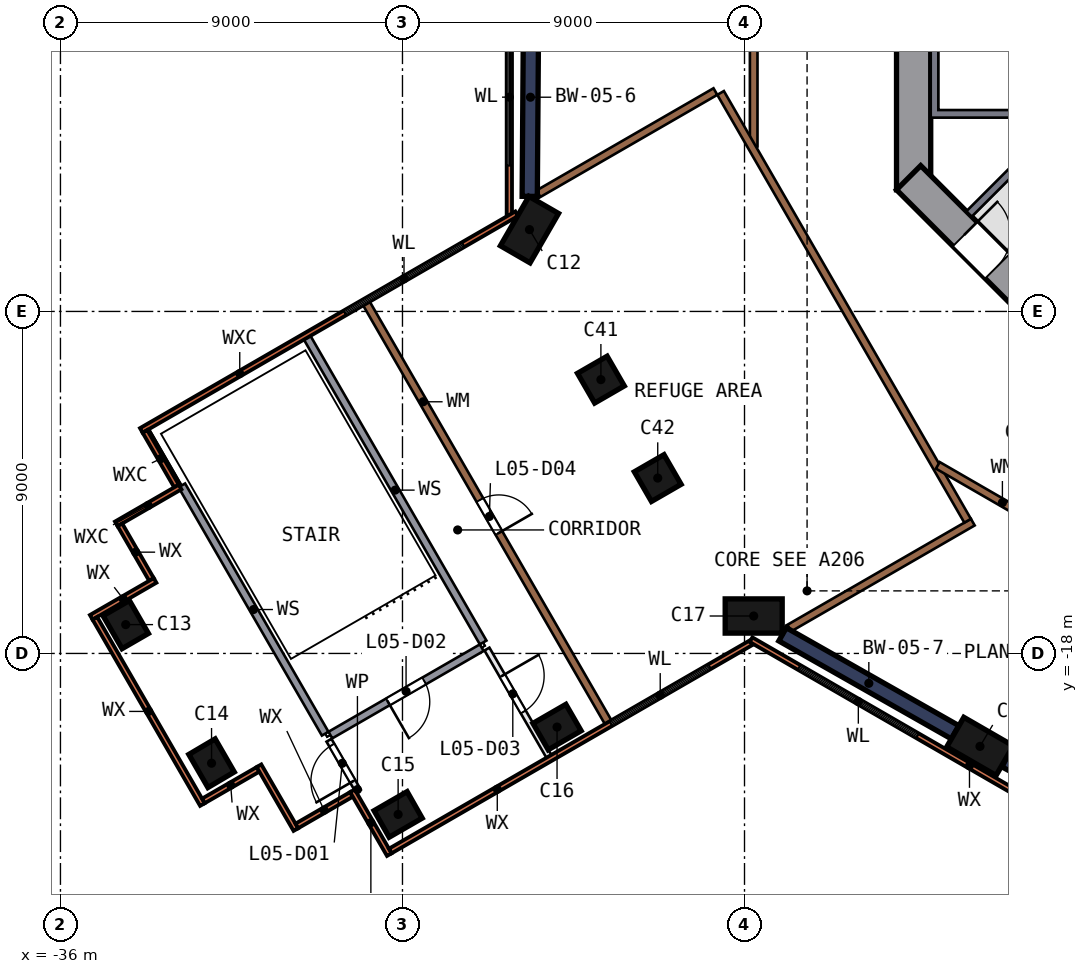
"""IFC4 building model, lengths in metres.
Left out: names, types, materials, properties, quantities, classifications, styles, units other than length and angle.
Written with IfcOpenShell. Run it as: python <this file> out.ifc"""

import sys

from ifc_helpers import new_model, si_unit, direction, frame, frame_2d, origin, origin_2d, place, context, subcontext, project, spatial, polyline, rectangle, outline, extrude, element, fill, save


model = new_model("IFC4")
c1 = context("Model", 3, precision=1e-05, world=origin(), true_north=direction((0.0, 1.0)))
c2 = subcontext(c1, "Body", "Model", "MODEL_VIEW")
j1 = project(units=[si_unit("LENGTHUNIT", "METRE"), si_unit("PLANEANGLEUNIT", "RADIAN")], contexts=[c1])
p1 = place(None, origin())
s1 = spatial("IfcSite", under=j1, at=p1, CompositionType="ELEMENT")
p2 = place(p1, origin())
s2 = spatial("IfcBuilding", under=s1, at=p2, CompositionType="ELEMENT")
p3 = place(p2, frame((0.0, 0.0, 28.0)))
s3 = spatial("IfcBuildingStorey", under=s2, at=p3, CompositionType="ELEMENT", Elevation=28.0)
p4 = place(p3, frame((-23.658, -6.846, 0.0), z_axis=(0.0, 0.0, 1.0), x_axis=(0.5, 0.866025404, 0.0)))
e1 = element("IfcColumn", 1, at=p4, inside=s3, PredefinedType="COLUMN", context=c2, shape_type="SweptSolid", body=[
    extrude(rectangle(XDim=1.5, YDim=0.9, at=origin_2d()), origin(), (0.0, 0.0, 1.0), 4.5),
])
p5 = place(p3, frame((-34.269, -17.245, 0.0), z_axis=(-0.011392437, 0.003037983, 0.999930489), x_axis=(0.500958571, -0.86543111, 0.008336884)))
e2 = element("IfcColumn", 2, at=p5, inside=s3, PredefinedType="COLUMN", context=c2, shape_type="SweptSolid", body=[
    extrude(rectangle(XDim=1.0, YDim=0.8, at=origin_2d()), origin(), (0.0, 0.0, 1.0), 4.5),
])
p6 = place(p3, frame((-32.069, -21.055, 0.0), z_axis=(0.036839002, 0.137474992, 0.98981994), x_axis=(0.506261539, -0.856548091, 0.100123031)))
e3 = element("IfcColumn", 3, at=p6, inside=s3, PredefinedType="COLUMN", context=c2, shape_type="SweptSolid", body=[
    extrude(rectangle(XDim=1.0, YDim=0.8, at=origin_2d()), origin(), (0.0, 0.0, 1.0), 4.546),
])
p7 = place(p3, frame((-27.151, -22.373, 0.0), z_axis=(0.030280943, 0.113041669, 0.993128715), x_axis=(0.866456981, 0.492394003, -0.082464814)))
e4 = element("IfcColumn", 4, at=p7, inside=s3, PredefinedType="COLUMN", context=c2, shape_type="SweptSolid", body=[
    extrude(rectangle(XDim=1.0, YDim=0.8, at=origin_2d()), origin(), (0.0, 0.0, 1.0), 4.531),
])
p8 = place(p3, frame((-22.883, -20.024, 0.0), z_axis=(-0.041522775, 0.07190793, 0.996546591), x_axis=(0.865990401, 0.500060622, 0.0)))
e5 = element("IfcColumn", 5, at=p8, inside=s3, PredefinedType="COLUMN", context=c2, shape_type="SweptSolid", body=[
    extrude(rectangle(XDim=1.0, YDim=0.8, at=origin_2d()), origin(), (0.0, 0.0, 1.0), 4.516),
])
p9 = place(p3, frame((-17.758, -17.065, 0.0), z_axis=(0.0, 0.042279868, 0.999105807), x_axis=(-1.0, 0.0, 0.0)))
e6 = element("IfcColumn", 6, at=p9, inside=s3, PredefinedType="COLUMN", context=c2, shape_type="SweptSolid", body=[
    extrude(rectangle(XDim=1.5, YDim=0.9, at=origin_2d()), origin(), (0.0, 0.0, 1.0), 4.504),
])
p10 = place(p3, frame((-11.804, -20.445, 0.0), z_axis=(0.0, 0.0, 1.0), x_axis=(0.866025404, -0.5, 0.0)))
e7 = element("IfcColumn", 7, at=p10, inside=s3, PredefinedType="COLUMN", context=c2, shape_type="SweptSolid", body=[
    extrude(rectangle(XDim=1.5, YDim=0.9, at=origin_2d()), origin(), (0.0, 0.0, 1.0), 4.5),
])
p11 = place(p3, frame((-21.733, -10.873, 0.0), z_axis=(-0.037922163, 0.065674045, 0.997120268), x_axis=(-0.86599551, -0.500051773, 0.0)))
e8 = element("IfcColumn", 8, at=p11, inside=s3, PredefinedType="COLUMN", context=c2, shape_type="SweptSolid", body=[
    extrude(rectangle(XDim=0.9, YDim=0.9, at=origin_2d()), origin(), (0.0, 0.0, 1.0), 4.513),
])
p12 = place(p3, frame((-20.283, -13.385, 0.0), z_axis=(0.0, 0.0, 1.0), x_axis=(-0.866025404, -0.5, 0.0)))
e9 = element("IfcColumn", 9, at=p12, inside=s3, PredefinedType="COLUMN", context=c2, shape_type="SweptSolid", body=[
    extrude(rectangle(XDim=0.9, YDim=0.9, at=origin_2d()), origin(), (0.0, 0.0, 1.0), 4.5),
])
p13 = place(p3, frame((-13.55, 5.799, 0.0), z_axis=(0.0, 0.0, 1.0), x_axis=(0.0, -1.0, 0.0)))
e10 = element("IfcWall", 10, at=p13, inside=s3, PredefinedType="SHEAR", context=c2, shape_type="SweptSolid", body=[
    extrude(rectangle(XDim=11.598, YDim=0.9, at=frame_2d((5.799, 0.0))), origin(), (0.0, 0.0, 1.0), 6.0),
])
p14 = place(p13, frame((4.899, 0.0, 0.0)))
e11 = element("IfcOpeningElement", 11, at=p14, cuts=e10, PredefinedType="OPENING", context=c2, shape_type="SweptSolid", body=[
    extrude(rectangle(XDim=1.8, YDim=2.1, at=frame_2d((0.9, 1.05))), frame((0.0, 0.46, 0.0), z_axis=(0.0, -1.0, 0.0), x_axis=(1.0, 0.0, 0.0)), (0.0, 0.0, 1.0), 0.92),
])
p15 = place(p3, frame((-13.682, -5.481, 0.0), z_axis=(0.0, 0.0, 1.0), x_axis=(0.707106781, -0.707106781, 0.0)))
e12 = element("IfcWall", 12, at=p15, inside=s3, PredefinedType="SHEAR", context=c2, shape_type="SweptSolid", body=[
    extrude(rectangle(XDim=11.598, YDim=0.9, at=frame_2d((5.799, 0.0))), origin(), (0.0, 0.0, 1.0), 6.0),
])
p16 = place(p15, frame((2.099, 0.0, 0.0)))
e13 = element("IfcOpeningElement", 13, at=p16, cuts=e12, PredefinedType="OPENING", context=c2, shape_type="SweptSolid", body=[
    extrude(rectangle(XDim=1.2, YDim=2.1, at=frame_2d((0.6, 1.05))), frame((0.0, 0.46, 0.0), z_axis=(0.0, -1.0, 0.0), x_axis=(1.0, 0.0, 0.0)), (0.0, 0.0, 1.0), 0.92),
])
p17 = place(p3, frame((-23.614, -0.753, 0.0), z_axis=(0.0, 0.0, 1.0), x_axis=(-0.00729771, -0.999973371, 0.0)))
e14 = element("IfcWall", 14, at=p17, inside=s3, PredefinedType="SHEAR", context=c2, shape_type="SweptSolid", body=[
    extrude(rectangle(XDim=5.219, YDim=0.4, at=frame_2d((2.609, 0.0))), origin(), (0.0, 0.0, 1.0), 4.5),
])
p18 = place(p3, frame((-16.998, -17.497, 0.0), z_axis=(0.0, 0.0, 1.0), x_axis=(0.869667461, -0.493638034, 0.0)))
e15 = element("IfcWall", 15, at=p18, inside=s3, PredefinedType="SHEAR", context=c2, shape_type="SweptSolid", body=[
    extrude(rectangle(XDim=5.219, YDim=0.4, at=frame_2d((2.609, 0.0))), origin(), (0.0, 0.0, 1.0), 4.5),
])
p19 = place(p3, frame((-11.133, -20.808, 0.0), z_axis=(0.0, 0.0, 1.0), x_axis=(0.879988629, -0.474994751, 0.0)))
e16 = element("IfcWall", 16, at=p19, inside=s3, PredefinedType="SHEAR", context=c2, shape_type="SweptSolid", body=[
    extrude(rectangle(XDim=4.684, YDim=0.4, at=frame_2d((2.342, 0.0))), origin(), (0.0, 0.0, 1.0), 4.5),
])
p20 = place(p3, frame((-24.188, 6.341, 0.0), z_axis=(0.0, 0.0, 1.0), x_axis=(0.0, -1.0, 0.0)))
e17 = element("IfcWall", 17, at=p20, inside=s3, PredefinedType="SOLIDWALL", context=c2, shape_type="SweptSolid", body=[
    extrude(rectangle(XDim=12.801, YDim=0.14, at=frame_2d((6.4, 0.0))), origin(), (0.0, 0.0, 1.0), 4.5),
])
p21 = place(p20, frame((1.748, 0.0, 0.9)))
e18 = element("IfcOpeningElement", 18, at=p21, cuts=e17, PredefinedType="OPENING", context=c2, shape_type="SweptSolid", body=[
    extrude(rectangle(XDim=3.0, YDim=3.3, at=frame_2d((1.5, 1.65))), frame((0.0, 0.08, 0.0), z_axis=(0.0, -1.0, 0.0), x_axis=(1.0, 0.0, 0.0)), (0.0, 0.0, 1.0), 0.16),
])
p22 = place(p20, frame((7.902, 0.0, 0.9)))
e19 = element("IfcOpeningElement", 19, at=p22, cuts=e17, PredefinedType="OPENING", context=c2, shape_type="SweptSolid", body=[
    extrude(rectangle(XDim=3.6, YDim=3.3, at=frame_2d((1.8, 1.65))), frame((0.0, 0.08, 0.0), z_axis=(0.0, -1.0, 0.0), x_axis=(1.0, 0.0, 0.0)), (0.0, 0.0, 1.0), 0.16),
])
p23 = place(p3, frame((-23.995, -6.429, 0.0), z_axis=(0.0, 0.0, 1.0), x_axis=(-0.866018753, -0.500011519, 0.0)))
e20 = element("IfcWall", 20, at=p23, inside=s3, PredefinedType="SOLIDWALL", context=c2, shape_type="SweptSolid", body=[
    extrude(rectangle(XDim=11.405, YDim=0.14, at=frame_2d((5.703, 0.0))), origin(), (0.0, 0.0, 1.0), 4.5),
])
p24 = place(p23, frame((1.623, 0.0, 0.9)))
e21 = element("IfcOpeningElement", 21, at=p24, cuts=e20, PredefinedType="OPENING", context=c2, shape_type="SweptSolid", body=[
    extrude(rectangle(XDim=3.6, YDim=3.3, at=frame_2d((1.8, 1.65))), frame((0.0, 0.08, 0.0), z_axis=(0.0, -1.0, 0.0), x_axis=(1.0, 0.0, 0.0)), (0.0, 0.0, 1.0), 0.16),
])
p25 = place(p3, frame((-33.777, -12.157, 0.0), z_axis=(0.0, 0.0, 1.0), x_axis=(0.499887958, -0.866090081, 0.0)))
e22 = element("IfcWall", 22, at=p25, inside=s3, PredefinedType="SOLIDWALL", context=c2, shape_type="SweptSolid", body=[
    extrude(rectangle(XDim=1.66, YDim=0.14, at=frame_2d((0.83, 0.0))), origin(), (0.0, 0.0, 1.0), 4.5),
])
p26 = place(p3, frame((-32.851, -13.62, 0.0), z_axis=(0.0, 0.0, 1.0), x_axis=(-0.866011627, -0.500023862, 0.0)))
e23 = element("IfcWall", 23, at=p26, inside=s3, PredefinedType="SOLIDWALL", context=c2, shape_type="SweptSolid", body=[
    extrude(rectangle(XDim=1.94, YDim=0.14, at=frame_2d((0.97, 0.0))), origin(), (0.0, 0.0, 1.0), 4.5),
])
p27 = place(p3, frame((-34.436, -14.616, 0.0), z_axis=(0.0, 0.0, 1.0), x_axis=(0.500061949, -0.865989634, 0.0)))
e24 = element("IfcWall", 24, at=p27, inside=s3, PredefinedType="SOLIDWALL", context=c2, shape_type="SweptSolid", body=[
    extrude(rectangle(XDim=1.66, YDim=0.14, at=frame_2d((0.83, 0.0))), origin(), (0.0, 0.0, 1.0), 4.5),
])
p28 = place(p3, frame((-33.51, -16.079, 0.0), z_axis=(0.0, 0.0, 1.0), x_axis=(-0.866011627, -0.500023862, 0.0)))
e25 = element("IfcWall", 25, at=p28, inside=s3, PredefinedType="SOLIDWALL", context=c2, shape_type="SweptSolid", body=[
    extrude(rectangle(XDim=1.94, YDim=0.14, at=frame_2d((0.97, 0.0))), origin(), (0.0, 0.0, 1.0), 4.5),
])
p29 = place(p3, frame((-35.094, -17.075, 0.0), z_axis=(0.0, 0.0, 1.0), x_axis=(0.499998748, -0.866026127, 0.0)))
e26 = element("IfcWall", 26, at=p29, inside=s3, PredefinedType="SOLIDWALL", context=c2, shape_type="SweptSolid", body=[
    extrude(rectangle(XDim=5.66, YDim=0.14, at=frame_2d((2.83, 0.0))), origin(), (0.0, 0.0, 1.0), 4.5),
])
p30 = place(p3, frame((-32.239, -21.881, 0.0), z_axis=(0.0, 0.0, 1.0), x_axis=(0.866026406, 0.499998264, 0.0)))
e27 = element("IfcWall", 27, at=p30, inside=s3, PredefinedType="SOLIDWALL", context=c2, shape_type="SweptSolid", body=[
    extrude(rectangle(XDim=1.66, YDim=0.14, at=frame_2d((0.83, 0.0))), origin(), (0.0, 0.0, 1.0), 4.5),
])
p31 = place(p3, frame((-30.775, -20.955, 0.0), z_axis=(0.0, 0.0, 1.0), x_axis=(0.499969368, -0.866043088, 0.0)))
e28 = element("IfcWall", 28, at=p31, inside=s3, PredefinedType="SOLIDWALL", context=c2, shape_type="SweptSolid", body=[
    extrude(rectangle(XDim=1.94, YDim=0.14, at=frame_2d((0.97, 0.0))), origin(), (0.0, 0.0, 1.0), 4.5),
])
p32 = place(p3, frame((-29.78, -22.54, 0.0), z_axis=(0.0, 0.0, 1.0), x_axis=(0.865989634, 0.500061949, 0.0)))
e29 = element("IfcWall", 29, at=p32, inside=s3, PredefinedType="SOLIDWALL", context=c2, shape_type="SweptSolid", body=[
    extrude(rectangle(XDim=1.66, YDim=0.14, at=frame_2d((0.83, 0.0))), origin(), (0.0, 0.0, 1.0), 4.5),
])
p33 = place(p3, frame((-28.317, -21.614, 0.0), z_axis=(0.0, 0.0, 1.0), x_axis=(0.499969368, -0.866043088, 0.0)))
e30 = element("IfcWall", 30, at=p33, inside=s3, PredefinedType="SOLIDWALL", context=c2, shape_type="SweptSolid", body=[
    extrude(rectangle(XDim=1.94, YDim=0.14, at=frame_2d((0.97, 0.0))), origin(), (0.0, 0.0, 1.0), 4.5),
])
p34 = place(p3, frame((-27.321, -23.198, 0.0), z_axis=(0.0, 0.0, 1.0), x_axis=(0.866030546, 0.499991093, 0.0)))
e31 = element("IfcWall", 31, at=p34, inside=s3, PredefinedType="SOLIDWALL", context=c2, shape_type="SweptSolid", body=[
    extrude(rectangle(XDim=10.961, YDim=0.14, at=frame_2d((5.48, 0.0))), origin(), (0.0, 0.0, 1.0), 4.5),
])
p35 = place(p34, frame((6.702, 0.0, 0.9)))
e32 = element("IfcOpeningElement", 32, at=p35, cuts=e31, PredefinedType="OPENING", context=c2, shape_type="SweptSolid", body=[
    extrude(rectangle(XDim=3.0, YDim=3.3, at=frame_2d((1.5, 1.65))), frame((0.0, 0.08, 0.0), z_axis=(0.0, -1.0, 0.0), x_axis=(1.0, 0.0, 0.0)), (0.0, 0.0, 1.0), 0.16),
])
p36 = place(p3, frame((-17.828, -17.637, 0.0), z_axis=(0.0, 0.0, 1.0), x_axis=(0.866029009, -0.499993756, 0.0)))
e33 = element("IfcWall", 33, at=p36, inside=s3, PredefinedType="SOLIDWALL", context=c2, shape_type="SweptSolid", body=[
    extrude(rectangle(XDim=13.242, YDim=0.14, at=frame_2d((6.621, 0.0))), origin(), (0.0, 0.0, 1.0), 4.5),
])
p37 = place(p36, frame((1.46, 0.0, 0.9)))
e34 = element("IfcOpeningElement", 34, at=p37, cuts=e33, PredefinedType="OPENING", context=c2, shape_type="SweptSolid", body=[
    extrude(rectangle(XDim=3.6, YDim=3.3, at=frame_2d((1.8, 1.65))), frame((0.0, 0.08, 0.0), z_axis=(0.0, -1.0, 0.0), x_axis=(1.0, 0.0, 0.0)), (0.0, 0.0, 1.0), 0.16),
])
p38 = place(p36, frame((8.215, 0.0, 0.9)))
e35 = element("IfcOpeningElement", 35, at=p38, cuts=e33, PredefinedType="OPENING", context=c2, shape_type="SweptSolid", body=[
    extrude(rectangle(XDim=3.0, YDim=3.3, at=frame_2d((1.5, 1.65))), frame((0.0, 0.08, 0.0), z_axis=(0.0, -1.0, 0.0), x_axis=(1.0, 0.0, 0.0)), (0.0, 0.0, 1.0), 0.16),
])
p39 = place(p3, origin())
e36 = element("IfcWall", 36, at=p39, inside=s3, PredefinedType="SOLIDWALL", context=c2, shape_type="SweptSolid", body=[
    extrude(outline(polyline([(-10.7, -3.9), (-13.1, -3.9), (-13.1, -1.2), (-10.7, -1.2), (-10.7, -3.9)]), holes=[polyline([(-12.9, -1.4), (-12.9, -3.7), (-10.9, -3.7), (-10.9, -1.4), (-12.9, -1.4)])]), origin(), (0.0, 0.0, 1.0), 5.55),
])
p40 = place(p3, frame((-9.334, -3.677, 0.0), z_axis=(0.0, 0.0, 1.0), x_axis=(-0.707106781, -0.707106781, 0.0)))
e37 = element("IfcWall", 37, at=p40, inside=s3, PredefinedType="SOLIDWALL", context=c2, shape_type="SweptSolid", body=[
    extrude(rectangle(XDim=3.9, YDim=0.2, at=frame_2d((1.95, 0.0))), origin(), (0.0, 0.0, 1.0), 5.55),
])
p41 = place(p3, frame((-32.807, -13.577, 0.0), z_axis=(0.0, 0.0, 1.0), x_axis=(0.50000534, -0.866022321, 0.0)))
e38 = element("IfcWall", 38, at=p41, inside=s3, PredefinedType="SOLIDWALL", context=c2, shape_type="SweptSolid", body=[
    extrude(rectangle(XDim=7.545, YDim=0.2, at=frame_2d((3.773, 0.0))), origin(), (0.0, 0.0, 1.0), 4.5),
])
p42 = place(p3, frame((-28.162, -21.623, 0.0), z_axis=(0.0, 0.0, 1.0), x_axis=(-0.499877454, 0.866096144, 0.0)))
e39 = element("IfcWall", 39, at=p42, inside=s3, PredefinedType="PARTITIONING", context=c2, shape_type="SweptSolid", body=[
    extrude(rectangle(XDim=1.545, YDim=0.15, at=frame_2d((0.773, 0.0))), origin(), (0.0, 0.0, 1.0), 4.5),
])
p43 = place(p42, frame((0.295, 0.0, 0.0)))
e40 = element("IfcOpeningElement", 40, at=p43, cuts=e39, PredefinedType="OPENING", context=c2, shape_type="SweptSolid", body=[
    extrude(rectangle(XDim=1.1, YDim=2.1, at=frame_2d((0.55, 1.05))), frame((0.0, 0.085, 0.0), z_axis=(0.0, -1.0, 0.0), x_axis=(1.0, 0.0, 0.0)), (0.0, 0.0, 1.0), 0.17),
])
p44 = place(p3, frame((-24.914, -17.848, 0.0), z_axis=(0.0, 0.0, 1.0), x_axis=(-0.86601677, -0.500014953, 0.0)))
e41 = element("IfcWall", 41, at=p44, inside=s3, PredefinedType="SOLIDWALL", context=c2, shape_type="SweptSolid", body=[
    extrude(rectangle(XDim=4.6, YDim=0.2, at=frame_2d((2.3, 0.0))), origin(), (0.0, 0.0, 1.0), 4.5),
])
p45 = place(p44, frame((1.75, 0.0, 0.0)))
e42 = element("IfcOpeningElement", 42, at=p45, cuts=e41, PredefinedType="OPENING", context=c2, shape_type="SweptSolid", body=[
    extrude(rectangle(XDim=1.1, YDim=2.1, at=frame_2d((0.55, 1.05))), frame((0.0, 0.11, 0.0), z_axis=(0.0, -1.0, 0.0), x_axis=(1.0, 0.0, 0.0)), (0.0, 0.0, 1.0), 0.22),
])
p46 = place(p3, frame((-24.877, -17.712, 0.0), z_axis=(0.0, 0.0, 1.0), x_axis=(-0.499984148, 0.866034555, 0.0)))
e43 = element("IfcWall", 43, at=p46, inside=s3, PredefinedType="SOLIDWALL", context=c2, shape_type="SweptSolid", body=[
    extrude(rectangle(XDim=9.26, YDim=0.2, at=frame_2d((4.63, 0.0))), origin(), (0.0, 0.0, 1.0), 4.5),
])
p47 = place(p3, frame((-24.777, -17.885, 0.0), z_axis=(0.0, 0.0, 1.0), x_axis=(0.499996863, -0.866027215, 0.0)))
e44 = element("IfcWall", 44, at=p47, inside=s3, PredefinedType="PARTITIONING", context=c2, shape_type="SweptSolid", body=[
    extrude(rectangle(XDim=3.26, YDim=0.15, at=frame_2d((1.63, 0.0))), origin(), (0.0, 0.0, 1.0), 4.5),
])
p48 = place(p47, frame((0.81, 0.0, 0.0)))
e45 = element("IfcOpeningElement", 45, at=p48, cuts=e44, PredefinedType="OPENING", context=c2, shape_type="SweptSolid", body=[
    extrude(rectangle(XDim=1.1, YDim=2.1, at=frame_2d((0.55, 1.05))), frame((0.0, 0.085, 0.0), z_axis=(0.0, -1.0, 0.0), x_axis=(1.0, 0.0, 0.0)), (0.0, 0.0, 1.0), 0.17),
])
p49 = place(p3, frame((-27.948, -8.792, 0.0), z_axis=(0.0, 0.0, 1.0), x_axis=(0.499991053, -0.866030569, 0.0)))
e46 = element("IfcWall", 46, at=p49, inside=s3, PredefinedType="SOLIDWALL", context=c2, shape_type="SweptSolid", body=[
    extrude(rectangle(XDim=12.72, YDim=0.2, at=frame_2d((6.36, 0.0))), origin(), (0.0, 0.0, 1.0), 4.5),
])
p50 = place(p49, frame((5.97, 0.0, 0.0)))
e47 = element("IfcOpeningElement", 47, at=p50, cuts=e46, PredefinedType="OPENING", context=c2, shape_type="SweptSolid", body=[
    extrude(rectangle(XDim=1.0, YDim=2.1, at=frame_2d((0.5, 1.05))), frame((0.0, 0.11, 0.0), z_axis=(0.0, -1.0, 0.0), x_axis=(1.0, 0.0, 0.0)), (0.0, 0.0, 1.0), 0.22),
])
p51 = place(p3, frame((-18.766, -3.213, 0.0), z_axis=(0.0, 0.0, 1.0), x_axis=(-0.866015419, -0.500017293, 0.0)))
e48 = element("IfcWall", 48, at=p51, inside=s3, PredefinedType="SOLIDWALL", context=c2, shape_type="SweptSolid", body=[
    extrude(rectangle(XDim=5.376, YDim=0.2, at=frame_2d((2.688, 0.0))), origin(), (0.0, 0.0, 1.0), 4.5),
])
p52 = place(p3, frame((-17.758, -4.658, 0.0), z_axis=(0.0, 0.0, 1.0), x_axis=(0.0, 1.0, 0.0)))
e49 = element("IfcWall", 49, at=p52, inside=s3, PredefinedType="SOLIDWALL", context=c2, shape_type="SweptSolid", body=[
    extrude(rectangle(XDim=9.075, YDim=0.2, at=frame_2d((4.538, 0.0))), origin(), (0.0, 0.0, 1.0), 4.5),
])
p53 = place(p52, frame((3.95, 0.0, 0.0)))
e50 = element("IfcOpeningElement", 50, at=p53, cuts=e49, PredefinedType="OPENING", context=c2, shape_type="SweptSolid", body=[
    extrude(rectangle(XDim=1.0, YDim=2.1, at=frame_2d((0.5, 1.05))), frame((0.0, 0.11, 0.0), z_axis=(0.0, -1.0, 0.0), x_axis=(1.0, 0.0, 0.0)), (0.0, 0.0, 1.0), 0.22),
])
p54 = place(p3, frame((-16.821, -17.333, 0.0), z_axis=(0.0, 0.0, 1.0), x_axis=(0.866003288, 0.500038303, 0.0)))
e51 = element("IfcWall", 51, at=p54, inside=s3, PredefinedType="SOLIDWALL", context=c2, shape_type="SweptSolid", body=[
    extrude(rectangle(XDim=5.576, YDim=0.2, at=frame_2d((2.788, 0.0))), origin(), (0.0, 0.0, 1.0), 4.5),
])
p55 = place(p3, frame((-12.129, -14.508, 0.0), z_axis=(0.0, 0.0, 1.0), x_axis=(-0.500000982, 0.866024837, 0.0)))
e52 = element("IfcWall", 52, at=p55, inside=s3, PredefinedType="SOLIDWALL", context=c2, shape_type="SweptSolid", body=[
    extrude(rectangle(XDim=13.0, YDim=0.2, at=frame_2d((6.5, 0.0))), origin(), (0.0, 0.0, 1.0), 4.5),
])
p56 = place(p3, frame((-5.054, -17.587, 0.0), z_axis=(0.0, 0.0, 1.0), x_axis=(-0.866031025, 0.499990264, 0.0)))
e53 = element("IfcWall", 53, at=p56, inside=s3, PredefinedType="SOLIDWALL", context=c2, shape_type="SweptSolid", body=[
    extrude(rectangle(XDim=9.075, YDim=0.2, at=frame_2d((4.538, 0.0))), origin(), (0.0, 0.0, 1.0), 4.5),
])
p57 = place(p56, frame((3.95, 0.0, 0.0)))
e54 = element("IfcOpeningElement", 54, at=p57, cuts=e53, PredefinedType="OPENING", context=c2, shape_type="SweptSolid", body=[
    extrude(rectangle(XDim=1.0, YDim=2.1, at=frame_2d((0.5, 1.05))), frame((0.0, 0.11, 0.0), z_axis=(0.0, -1.0, 0.0), x_axis=(1.0, 0.0, 0.0)), (0.0, 0.0, 1.0), 0.22),
])
p58 = place(p22, origin())
e55 = element("IfcWindow", 55, at=p58, inside=s3, PartitioningType="SINGLE_PANEL", PredefinedType="WINDOW", context=c2, shape_type="SweptSolid", body=[
    extrude(rectangle(XDim=3.6, YDim=3.3, at=frame_2d((1.8, 1.65))), frame((0.0, 0.03, 0.0), z_axis=(0.0, -1.0, 0.0), x_axis=(1.0, 0.0, 0.0)), (0.0, 0.0, 1.0), 0.06),
])
fill(e19, e55)
p59 = place(p24, origin())
e56 = element("IfcWindow", 56, at=p59, inside=s3, PartitioningType="SINGLE_PANEL", PredefinedType="WINDOW", context=c2, shape_type="SweptSolid", body=[
    extrude(rectangle(XDim=3.6, YDim=3.3, at=frame_2d((1.8, 1.65))), frame((0.0, 0.03, 0.0), z_axis=(0.0, -1.0, 0.0), x_axis=(1.0, 0.0, 0.0)), (0.0, 0.0, 1.0), 0.06),
])
fill(e21, e56)
p60 = place(p35, origin())
e57 = element("IfcWindow", 57, at=p60, inside=s3, PartitioningType="SINGLE_PANEL", PredefinedType="WINDOW", context=c2, shape_type="SweptSolid", body=[
    extrude(rectangle(XDim=3.0, YDim=3.3, at=frame_2d((1.5, 1.65))), frame((0.0, 0.03, 0.0), z_axis=(0.0, -1.0, 0.0), x_axis=(1.0, 0.0, 0.0)), (0.0, 0.0, 1.0), 0.06),
])
fill(e32, e57)
p61 = place(p37, origin())
e58 = element("IfcWindow", 58, at=p61, inside=s3, PartitioningType="SINGLE_PANEL", PredefinedType="WINDOW", context=c2, shape_type="SweptSolid", body=[
    extrude(rectangle(XDim=3.6, YDim=3.3, at=frame_2d((1.8, 1.65))), frame((0.0, 0.03, 0.0), z_axis=(0.0, -1.0, 0.0), x_axis=(1.0, 0.0, 0.0)), (0.0, 0.0, 1.0), 0.06),
])
fill(e34, e58)
p62 = place(p16, origin())
e59 = element("IfcDoor", 59, at=p62, inside=s3, OperationType="SINGLE_SWING_LEFT", PredefinedType="DOOR", context=c2, shape_type="SweptSolid", body=[
    extrude(rectangle(XDim=1.2, YDim=2.1, at=frame_2d((0.6, 1.05))), frame((0.0, 0.025, 0.0), z_axis=(0.0, -1.0, 0.0), x_axis=(1.0, 0.0, 0.0)), (0.0, 0.0, 1.0), 0.05),
])
fill(e13, e59)
p63 = place(p43, origin())
e60 = element("IfcDoor", 60, at=p63, inside=s3, OperationType="SINGLE_SWING_LEFT", PredefinedType="DOOR", context=c2, shape_type="SweptSolid", body=[
    extrude(rectangle(XDim=1.1, YDim=2.1, at=frame_2d((0.55, 1.05))), frame((0.0, 0.025, 0.0), z_axis=(0.0, -1.0, 0.0), x_axis=(1.0, 0.0, 0.0)), (0.0, 0.0, 1.0), 0.05),
])
fill(e40, e60)
p64 = place(p45, origin())
e61 = element("IfcDoor", 61, at=p64, inside=s3, OperationType="SINGLE_SWING_RIGHT", PredefinedType="DOOR", context=c2, shape_type="SweptSolid", body=[
    extrude(rectangle(XDim=1.1, YDim=2.1, at=frame_2d((0.55, 1.05))), frame((0.0, 0.025, 0.0), z_axis=(0.0, -1.0, 0.0), x_axis=(1.0, 0.0, 0.0)), (0.0, 0.0, 1.0), 0.05),
])
fill(e42, e61)
p65 = place(p48, origin())
e62 = element("IfcDoor", 62, at=p65, inside=s3, OperationType="SINGLE_SWING_LEFT", PredefinedType="DOOR", context=c2, shape_type="SweptSolid", body=[
    extrude(rectangle(XDim=1.1, YDim=2.1, at=frame_2d((0.55, 1.05))), frame((0.0, 0.025, 0.0), z_axis=(0.0, -1.0, 0.0), x_axis=(1.0, 0.0, 0.0)), (0.0, 0.0, 1.0), 0.05),
])
fill(e45, e62)
p66 = place(p50, origin())
e63 = element("IfcDoor", 63, at=p66, inside=s3, OperationType="SINGLE_SWING_RIGHT", PredefinedType="DOOR", context=c2, shape_type="SweptSolid", body=[
    extrude(rectangle(XDim=1.0, YDim=2.1, at=frame_2d((0.5, 1.05))), frame((0.0, 0.025, 0.0), z_axis=(0.0, -1.0, 0.0), x_axis=(1.0, 0.0, 0.0)), (0.0, 0.0, 1.0), 0.05),
])
fill(e47, e63)
save(model, sys.argv[1])
